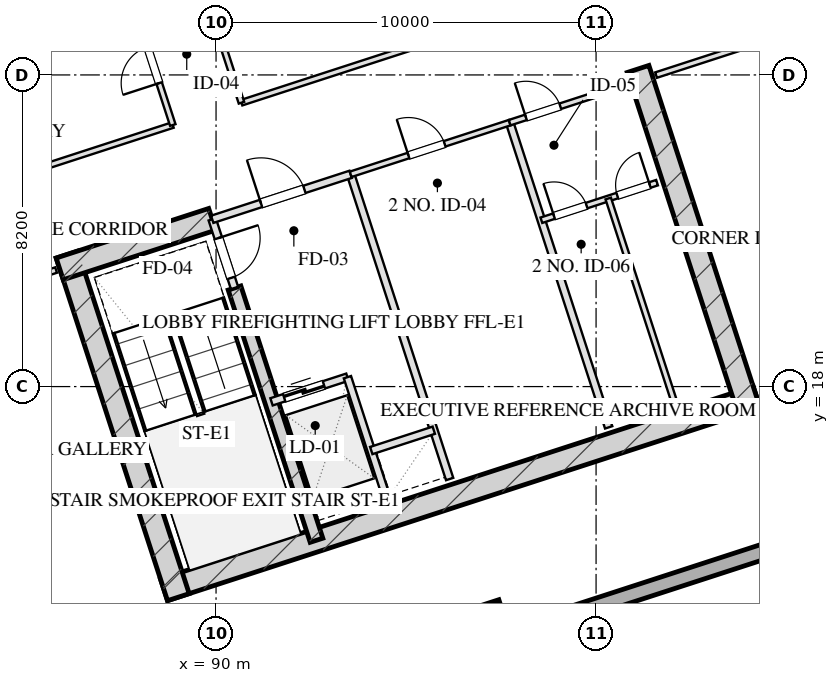
"""IFC4 building model, lengths in metres.
Left out: names, types, materials, properties, quantities, classifications, styles, units other than length and angle.
Written with IfcOpenShell. Run it as: python <this file> out.ifc"""

import sys

from ifc_helpers import new_model, si_unit, direction, frame, frame_2d, origin, origin_2d, place, context, subcontext, project, spatial, rectangle, hollow_rectangle, extrude, element, fill, save


model = new_model("IFC4")
c1 = context("Model", 3, precision=1e-05, world=origin(), true_north=direction((0.0, 1.0)))
c2 = subcontext(c1, "Body", "Model", "MODEL_VIEW")
j1 = project(units=[si_unit("LENGTHUNIT", "METRE"), si_unit("PLANEANGLEUNIT", "RADIAN")], contexts=[c1])
p1 = place(None, origin())
s1 = spatial("IfcSite", under=j1, at=p1, CompositionType="ELEMENT")
p2 = place(p1, origin())
s2 = spatial("IfcBuilding", under=s1, at=p2, CompositionType="ELEMENT")
p3 = place(p2, frame((0.0, 0.0, 180.55)))
s3 = spatial("IfcBuildingStorey", under=s2, at=p3, CompositionType="ELEMENT", Elevation=180.55)
p4 = place(p3, frame((88.63, 12.652, 0.0), z_axis=(0.0, 0.0, 1.0), x_axis=(0.95105714907, 0.309015046886, 0.0)))
e1 = element("IfcWall", 1, at=p4, inside=s3, PredefinedType="SHEAR", context=c2, shape_type="SweptSolid", body=[
    extrude(rectangle(XDim=16.4, YDim=0.6, at=frame_2d((8.2, 0.0))), origin(), (0.0, 0.0, 1.0), 3.45),
])
p5 = place(p3, frame((86.078, 21.475, 0.0), z_axis=(0.0, 0.0, 1.0), x_axis=(0.309017938678, -0.951056209472, 0.0)))
e2 = element("IfcWall", 2, at=p5, inside=s3, PredefinedType="SHEAR", context=c2, shape_type="SweptSolid", body=[
    extrude(rectangle(XDim=9.48, YDim=0.6, at=frame_2d((4.74, 0.0))), origin(), (0.0, 0.0, 1.0), 3.45),
])
p6 = place(p3, frame((101.105, 26.358, 0.0), z_axis=(0.0, 0.0, 1.0), x_axis=(0.309010370028, -0.95105866865, 0.0)))
e3 = element("IfcWall", 3, at=p6, inside=s3, PredefinedType="SHEAR", context=c2, shape_type="SweptSolid", body=[
    extrude(rectangle(XDim=9.48, YDim=0.6, at=frame_2d((4.74, 0.0))), origin(), (0.0, 0.0, 1.0), 3.45),
])
p7 = place(p3, frame((90.486, 20.594, 0.0), z_axis=(0.0, 0.0, 1.0), x_axis=(0.309020428229, -0.951055400562, 0.0)))
e4 = element("IfcWall", 4, at=p7, inside=s3, PredefinedType="SHEAR", context=c2, shape_type="SweptSolid", body=[
    extrude(rectangle(XDim=6.98, YDim=0.35, at=frame_2d((3.49, 0.0))), origin(), (0.0, 0.0, 1.0), 3.45),
])
p8 = place(p3, frame((85.886, 21.097, 0.0), z_axis=(0.0, 0.0, 1.0), x_axis=(0.951068073652, 0.308981422225, 0.0)))
e5 = element("IfcWall", 5, at=p8, inside=s3, PredefinedType="SHEAR", context=c2, shape_type="SweptSolid", body=[
    extrude(rectangle(XDim=4.22, YDim=0.6, at=frame_2d((2.11, 0.0))), origin(), (0.0, 0.0, 1.0), 3.45),
])
p9 = place(p3, frame((97.185, 11.888, 0.0), z_axis=(0.0, 0.0, 1.0), x_axis=(0.951056516295, 0.309016994375, 0.0)))
e6 = element("IfcColumn", 6, at=p9, inside=s3, PredefinedType="COLUMN", context=c2, shape_type="SweptSolid", body=[
    extrude(hollow_rectangle(XDim=0.8, YDim=0.8, WallThickness=0.028, at=origin_2d()), origin(), (0.0, 0.0, 1.0), 3.451),
])
p10 = place(p3, frame((98.224, 59.173, 0.0), z_axis=(0.0, 0.0, 1.0), x_axis=(0.309014228706, -0.951057414911, 0.0)))
e7 = element("IfcWall", 7, at=p10, inside=s3, PredefinedType="SOLIDWALL", context=c2, shape_type="SweptSolid", body=[
    extrude(rectangle(XDim=42.8, YDim=0.4, at=frame_2d((21.4, 0.0))), origin(), (0.0, 0.0, 1.0), 2.55),
])
p11 = place(p10, frame((26.75, 0.0, 0.75)))
e8 = element("IfcOpeningElement", 8, at=p11, cuts=e7, PredefinedType="OPENING", context=c2, shape_type="SweptSolid", body=[
    extrude(rectangle(XDim=2.1, YDim=1.4, at=frame_2d((1.05, 0.7))), frame((0.0, 0.21, 0.0), z_axis=(0.0, -1.0, 0.0), x_axis=(1.0, 0.0, 0.0)), (0.0, 0.0, 1.0), 0.42),
])
p12 = place(p10, frame((22.95, 0.0, 0.75)))
e9 = element("IfcOpeningElement", 9, at=p12, cuts=e7, PredefinedType="OPENING", context=c2, shape_type="SweptSolid", body=[
    extrude(rectangle(XDim=2.1, YDim=1.4, at=frame_2d((1.05, 0.7))), frame((0.0, 0.21, 0.0), z_axis=(0.0, -1.0, 0.0), x_axis=(1.0, 0.0, 0.0)), (0.0, 0.0, 1.0), 0.42),
])
p13 = place(p10, frame((17.75, 0.0, 0.75)))
e10 = element("IfcOpeningElement", 10, at=p13, cuts=e7, PredefinedType="OPENING", context=c2, shape_type="SweptSolid", body=[
    extrude(rectangle(XDim=2.1, YDim=1.4, at=frame_2d((1.05, 0.7))), frame((0.0, 0.21, 0.0), z_axis=(0.0, -1.0, 0.0), x_axis=(1.0, 0.0, 0.0)), (0.0, 0.0, 1.0), 0.42),
])
p14 = place(p10, frame((13.95, 0.0, 0.75)))
e11 = element("IfcOpeningElement", 11, at=p14, cuts=e7, PredefinedType="OPENING", context=c2, shape_type="SweptSolid", body=[
    extrude(rectangle(XDim=2.1, YDim=1.4, at=frame_2d((1.05, 0.7))), frame((0.0, 0.21, 0.0), z_axis=(0.0, -1.0, 0.0), x_axis=(1.0, 0.0, 0.0)), (0.0, 0.0, 1.0), 0.42),
])
p15 = place(p3, frame((109.908, 15.444, 0.0), z_axis=(0.0, 0.0, 1.0), x_axis=(-0.951057580055, -0.30901372044, 0.0)))
e12 = element("IfcWall", 12, at=p15, inside=s3, PredefinedType="SOLIDWALL", context=c2, shape_type="SweptSolid", body=[
    extrude(rectangle(XDim=26.4, YDim=0.4, at=frame_2d((13.2, 0.0))), origin(), (0.0, 0.0, 1.0), 2.55),
])
p16 = place(p3, frame((89.899, 22.401, 0.0), z_axis=(0.0, 0.0, 1.0), x_axis=(0.308932062672, -0.951084108086, 0.0)))
e13 = element("IfcWall", 13, at=p16, inside=s3, PredefinedType="PARTITIONING", context=c2, shape_type="SweptSolid", body=[
    extrude(rectangle(XDim=1.9, YDim=0.2, at=frame_2d((0.95, 0.0))), origin(), (0.0, 0.0, 1.0), 3.155),
])
p17 = place(p16, frame((0.52, 0.0, 0.0)))
e14 = element("IfcOpeningElement", 14, at=p17, cuts=e13, PredefinedType="OPENING", context=c2, shape_type="SweptSolid", body=[
    extrude(rectangle(XDim=1.1, YDim=2.05, at=frame_2d((0.55, 1.025))), frame((0.0, 0.11, 0.0), z_axis=(0.0, -1.0, 0.0), x_axis=(1.0, 0.0, 0.0)), (0.0, 0.0, 1.0), 0.22),
])
p18 = place(p3, frame((93.542, 23.585, 0.0), z_axis=(0.0, 0.0, 1.0), x_axis=(0.309042196757, -0.951048327176, 0.0)))
e15 = element("IfcWall", 15, at=p18, inside=s3, PredefinedType="PARTITIONING", context=c2, shape_type="SweptSolid", body=[
    extrude(rectangle(XDim=8.43, YDim=0.2, at=frame_2d((4.215, 0.0))), origin(), (0.0, 0.0, 1.0), 3.155),
])
p19 = place(p3, frame((89.899, 22.401, 0.0), z_axis=(0.0, 0.0, 1.0), x_axis=(0.951046716504, 0.309047153403, 0.0)))
e16 = element("IfcWall", 16, at=p19, inside=s3, PredefinedType="PARTITIONING", context=c2, shape_type="SweptSolid", body=[
    extrude(rectangle(XDim=3.83, YDim=0.2, at=frame_2d((1.915, 0.0))), origin(), (0.0, 0.0, 1.0), 3.155),
])
p20 = place(p19, frame((1.35, 0.0, 0.0)))
e17 = element("IfcOpeningElement", 17, at=p20, cuts=e16, PredefinedType="OPENING", context=c2, shape_type="SweptSolid", body=[
    extrude(rectangle(XDim=1.2, YDim=2.05, at=frame_2d((0.6, 1.025))), frame((0.0, 0.11, 0.0), z_axis=(0.0, -1.0, 0.0), x_axis=(1.0, 0.0, 0.0)), (0.0, 0.0, 1.0), 0.22),
])
p21 = place(p3, frame((91.46, 17.598, 0.0), z_axis=(0.0, 0.0, 1.0), x_axis=(0.951062257173, 0.308999325213, 0.0)))
e18 = element("IfcWall", 18, at=p21, inside=s3, PredefinedType="PARTITIONING", context=c2, shape_type="SweptSolid", body=[
    extrude(rectangle(XDim=2.1, YDim=0.2, at=frame_2d((1.05, 0.0))), origin(), (0.0, 0.0, 1.0), 3.155),
])
p22 = place(p21, frame((0.35, 0.0, 0.0)))
e19 = element("IfcOpeningElement", 19, at=p22, cuts=e18, PredefinedType="OPENING", context=c2, shape_type="SweptSolid", body=[
    extrude(rectangle(XDim=1.1, YDim=2.05, at=frame_2d((0.55, 1.025))), frame((0.0, 0.11, 0.0), z_axis=(0.0, -1.0, 0.0), x_axis=(1.0, 0.0, 0.0)), (0.0, 0.0, 1.0), 0.22),
])
p23 = place(p3, frame((93.457, 18.247, 0.0), z_axis=(0.0, 0.0, 1.0), x_axis=(0.3089935693, -0.951064127245, 0.0)))
e20 = element("IfcWall", 20, at=p23, inside=s3, PredefinedType="PARTITIONING", context=c2, shape_type="SweptSolid", body=[
    extrude(rectangle(XDim=3.7, YDim=0.2, at=frame_2d((1.85, 0.0))), origin(), (0.0, 0.0, 1.0), 3.155),
])
p24 = place(p3, frame((94.084, 16.317, 0.0), z_axis=(0.0, 0.0, 1.0), x_axis=(0.951041328149, 0.309063734775, 0.0)))
e21 = element("IfcWall", 21, at=p24, inside=s3, PredefinedType="PARTITIONING", context=c2, shape_type="SweptSolid", body=[
    extrude(rectangle(XDim=1.73, YDim=0.2, at=frame_2d((0.865, 0.0))), origin(), (0.0, 0.0, 1.0), 3.155),
])
p25 = place(p3, frame((97.727, 24.944, 0.0), z_axis=(0.0, 0.0, 1.0), x_axis=(0.309016001439, -0.951056838919, 0.0)))
e22 = element("IfcWall", 22, at=p25, inside=s3, PredefinedType="PARTITIONING", context=c2, shape_type="SweptSolid", body=[
    extrude(rectangle(XDim=8.43, YDim=0.2, at=frame_2d((4.215, 0.0))), origin(), (0.0, 0.0, 1.0), 3.155),
])
p26 = place(p3, frame((93.542, 23.585, 0.0), z_axis=(0.0, 0.0, 1.0), x_axis=(0.951063829732, 0.308994485023, 0.0)))
e23 = element("IfcWall", 23, at=p26, inside=s3, PredefinedType="PARTITIONING", context=c2, shape_type="SweptSolid", body=[
    extrude(rectangle(XDim=4.4, YDim=0.15, at=frame_2d((2.2, 0.0))), origin(), (0.0, 0.0, 1.0), 3.155),
])
p27 = place(p26, frame((1.6, 0.0, 0.0)))
e24 = element("IfcOpeningElement", 24, at=p27, cuts=e23, PredefinedType="OPENING", context=c2, shape_type="SweptSolid", body=[
    extrude(rectangle(XDim=1.0, YDim=2.05, at=frame_2d((0.5, 1.025))), frame((0.0, 0.085, 0.0), z_axis=(0.0, -1.0, 0.0), x_axis=(1.0, 0.0, 0.0)), (0.0, 0.0, 1.0), 0.17),
])
p28 = place(p3, frame((97.727, 24.944, 0.0), z_axis=(0.0, 0.0, 1.0), x_axis=(0.951036872128, 0.309077446369, 0.0)))
e25 = element("IfcWall", 25, at=p28, inside=s3, PredefinedType="PARTITIONING", context=c2, shape_type="SweptSolid", body=[
    extrude(rectangle(XDim=3.2, YDim=0.15, at=frame_2d((1.6, 0.0))), origin(), (0.0, 0.0, 1.0), 3.155),
])
p29 = place(p28, frame((0.45, 0.0, 0.0)))
e26 = element("IfcOpeningElement", 26, at=p29, cuts=e25, PredefinedType="OPENING", context=c2, shape_type="SweptSolid", body=[
    extrude(rectangle(XDim=0.95, YDim=2.05, at=frame_2d((0.475, 1.025))), frame((0.0, 0.085, 0.0), z_axis=(0.0, -1.0, 0.0), x_axis=(1.0, 0.0, 0.0)), (0.0, 0.0, 1.0), 0.17),
])
p30 = place(p3, frame((98.561, 22.376, 0.0), z_axis=(0.0, 0.0, 1.0), x_axis=(0.95104415986, 0.309055020985, 0.0)))
e27 = element("IfcWall", 27, at=p30, inside=s3, PredefinedType="PARTITIONING", context=c2, shape_type="SweptSolid", body=[
    extrude(rectangle(XDim=3.2, YDim=0.15, at=frame_2d((1.6, 0.0))), origin(), (0.0, 0.0, 1.0), 3.155),
])
p31 = place(p30, frame((0.35, 0.0, 0.0)))
e28 = element("IfcOpeningElement", 28, at=p31, cuts=e27, PredefinedType="OPENING", context=c2, shape_type="SweptSolid", body=[
    extrude(rectangle(XDim=0.9, YDim=2.05, at=frame_2d((0.45, 1.025))), frame((0.0, 0.085, 0.0), z_axis=(0.0, -1.0, 0.0), x_axis=(1.0, 0.0, 0.0)), (0.0, 0.0, 1.0), 0.17),
])
p32 = place(p30, frame((2.1, 0.0, 0.0)))
e29 = element("IfcOpeningElement", 29, at=p32, cuts=e27, PredefinedType="OPENING", context=c2, shape_type="SweptSolid", body=[
    extrude(rectangle(XDim=0.9, YDim=2.05, at=frame_2d((0.45, 1.025))), frame((0.0, 0.085, 0.0), z_axis=(0.0, -1.0, 0.0), x_axis=(1.0, 0.0, 0.0)), (0.0, 0.0, 1.0), 0.17),
])
p33 = place(p3, frame((100.32, 22.948, 0.0), z_axis=(0.0, 0.0, 1.0), x_axis=(0.309035009867, -0.951050662518, 0.0)))
e30 = element("IfcWall", 30, at=p33, inside=s3, PredefinedType="PARTITIONING", context=c2, shape_type="SweptSolid", body=[
    extrude(rectangle(XDim=5.73, YDim=0.15, at=frame_2d((2.865, 0.0))), origin(), (0.0, 0.0, 1.0), 3.155),
])
p34 = place(p3, frame((78.753, 18.78, 0.0), z_axis=(0.0, 0.0, 1.0), x_axis=(0.951060977215, 0.309003264738, 0.0)))
e31 = element("IfcWall", 31, at=p34, inside=s3, PredefinedType="PARTITIONING", context=c2, shape_type="SweptSolid", body=[
    extrude(rectangle(XDim=7.4, YDim=0.15, at=frame_2d((3.7, 0.0))), origin(), (0.0, 0.0, 1.0), 3.155),
])
p35 = place(p34, frame((3.108, 0.0, 0.0)))
e32 = element("IfcOpeningElement", 32, at=p35, cuts=e31, PredefinedType="OPENING", context=c2, shape_type="SweptSolid", body=[
    extrude(rectangle(XDim=1.0, YDim=2.05, at=frame_2d((0.5, 1.025))), frame((0.0, 0.085, 0.0), z_axis=(0.0, -1.0, 0.0), x_axis=(1.0, 0.0, 0.0)), (0.0, 0.0, 1.0), 0.17),
])
p36 = place(p3, frame((101.578, 26.196, 0.0), z_axis=(0.0, 0.0, 1.0), x_axis=(0.951064934653, 0.308991084134, 0.0)))
e33 = element("IfcWall", 33, at=p36, inside=s3, PredefinedType="PARTITIONING", context=c2, shape_type="SweptSolid", body=[
    extrude(rectangle(XDim=6.8, YDim=0.15, at=frame_2d((3.4, 0.0))), origin(), (0.0, 0.0, 1.0), 3.155),
])
p37 = place(p36, frame((2.856, 0.0, 0.0)))
e34 = element("IfcOpeningElement", 34, at=p37, cuts=e33, PredefinedType="OPENING", context=c2, shape_type="SweptSolid", body=[
    extrude(rectangle(XDim=1.0, YDim=2.05, at=frame_2d((0.5, 1.025))), frame((0.0, 0.085, 0.0), z_axis=(0.0, -1.0, 0.0), x_axis=(1.0, 0.0, 0.0)), (0.0, 0.0, 1.0), 0.17),
])
p38 = place(p3, frame((77.925, 21.328, 0.0), z_axis=(0.0, 0.0, 1.0), x_axis=(0.951054972381, 0.309021746015, 0.0)))
e35 = element("IfcWall", 35, at=p38, inside=s3, PredefinedType="PARTITIONING", context=c2, shape_type="SweptSolid", body=[
    extrude(rectangle(XDim=11.5, YDim=0.15, at=frame_2d((5.75, 0.0))), origin(), (0.0, 0.0, 1.0), 3.155),
])
p39 = place(p3, frame((90.669, 25.469, 0.0), z_axis=(0.0, 0.0, 1.0), x_axis=(0.95106136293, 0.309002077568, 0.0)))
e36 = element("IfcWall", 36, at=p39, inside=s3, PredefinedType="PARTITIONING", context=c2, shape_type="SweptSolid", body=[
    extrude(rectangle(XDim=8.15, YDim=0.15, at=frame_2d((4.075, 0.0))), origin(), (0.0, 0.0, 1.0), 3.155),
])
p40 = place(p3, frame((88.862, 24.882, 0.0), z_axis=(0.0, 0.0, 1.0), x_axis=(-0.309008771245, 0.951059188113, 0.0)))
e37 = element("IfcWall", 37, at=p40, inside=s3, PredefinedType="PARTITIONING", context=c2, shape_type="SweptSolid", body=[
    extrude(rectangle(XDim=16.64, YDim=0.15, at=frame_2d((8.32, 0.0))), origin(), (0.0, 0.0, 1.0), 3.155),
])
p41 = place(p40, frame((1.16, 0.0, 0.0)))
e38 = element("IfcOpeningElement", 38, at=p41, cuts=e37, PredefinedType="OPENING", context=c2, shape_type="SweptSolid", body=[
    extrude(rectangle(XDim=1.0, YDim=2.05, at=frame_2d((0.5, 1.025))), frame((0.0, 0.085, 0.0), z_axis=(0.0, -1.0, 0.0), x_axis=(1.0, 0.0, 0.0)), (0.0, 0.0, 1.0), 0.17),
])
p42 = place(p40, frame((5.48, 0.0, 0.0)))
e39 = element("IfcOpeningElement", 39, at=p42, cuts=e37, PredefinedType="OPENING", context=c2, shape_type="SweptSolid", body=[
    extrude(rectangle(XDim=1.05, YDim=2.05, at=frame_2d((0.525, 1.025))), frame((0.0, 0.085, 0.0), z_axis=(0.0, -1.0, 0.0), x_axis=(1.0, 0.0, 0.0)), (0.0, 0.0, 1.0), 0.17),
])
p43 = place(p40, frame((8.08, 0.0, 0.0)))
e40 = element("IfcOpeningElement", 40, at=p43, cuts=e37, PredefinedType="OPENING", context=c2, shape_type="SweptSolid", body=[
    extrude(rectangle(XDim=1.0, YDim=2.05, at=frame_2d((0.5, 1.025))), frame((0.0, 0.085, 0.0), z_axis=(0.0, -1.0, 0.0), x_axis=(1.0, 0.0, 0.0)), (0.0, 0.0, 1.0), 0.17),
])
p44 = place(p40, frame((10.92, 0.0, 0.0)))
e41 = element("IfcOpeningElement", 41, at=p44, cuts=e37, PredefinedType="OPENING", context=c2, shape_type="SweptSolid", body=[
    extrude(rectangle(XDim=1.0, YDim=2.05, at=frame_2d((0.5, 1.025))), frame((0.0, 0.085, 0.0), z_axis=(0.0, -1.0, 0.0), x_axis=(1.0, 0.0, 0.0)), (0.0, 0.0, 1.0), 0.17),
])
p45 = place(p40, frame((14.48, 0.0, 0.0)))
e42 = element("IfcOpeningElement", 42, at=p45, cuts=e37, PredefinedType="OPENING", context=c2, shape_type="SweptSolid", body=[
    extrude(rectangle(XDim=0.85, YDim=2.05, at=frame_2d((0.425, 1.025))), frame((0.0, 0.085, 0.0), z_axis=(0.0, -1.0, 0.0), x_axis=(1.0, 0.0, 0.0)), (0.0, 0.0, 1.0), 0.17),
])
p46 = place(p3, frame((90.669, 25.469, 0.0), z_axis=(0.0, 0.0, 1.0), x_axis=(-0.309022042254, 0.951054876125, 0.0)))
e43 = element("IfcWall", 43, at=p46, inside=s3, PredefinedType="PARTITIONING", context=c2, shape_type="SweptSolid", body=[
    extrude(rectangle(XDim=16.64, YDim=0.15, at=frame_2d((8.32, 0.0))), origin(), (0.0, 0.0, 1.0), 3.155),
])
p47 = place(p46, frame((1.944, 0.0, 0.0)))
e44 = element("IfcOpeningElement", 44, at=p47, cuts=e43, PredefinedType="OPENING", context=c2, shape_type="SweptSolid", body=[
    extrude(rectangle(XDim=1.1, YDim=2.05, at=frame_2d((0.55, 1.025))), frame((0.0, 0.085, 0.0), z_axis=(0.0, -1.0, 0.0), x_axis=(1.0, 0.0, 0.0)), (0.0, 0.0, 1.0), 0.17),
])
p48 = place(p46, frame((14.264, 0.0, 0.0)))
e45 = element("IfcOpeningElement", 45, at=p48, cuts=e43, PredefinedType="OPENING", context=c2, shape_type="SweptSolid", body=[
    extrude(rectangle(XDim=1.1, YDim=2.05, at=frame_2d((0.55, 1.025))), frame((0.0, 0.085, 0.0), z_axis=(0.0, -1.0, 0.0), x_axis=(1.0, 0.0, 0.0)), (0.0, 0.0, 1.0), 0.17),
])
p49 = place(p3, frame((76.59, 25.437, 0.0), z_axis=(0.0, 0.0, 1.0), x_axis=(0.951054972381, 0.309021746015, 0.0)))
e46 = element("IfcWall", 46, at=p49, inside=s3, PredefinedType="PARTITIONING", context=c2, shape_type="SweptSolid", body=[
    extrude(rectangle(XDim=11.5, YDim=0.15, at=frame_2d((5.75, 0.0))), origin(), (0.0, 0.0, 1.0), 3.155),
])
p50 = place(p17, origin())
e47 = element("IfcDoor", 47, at=p50, inside=s3, OperationType="SINGLE_SWING_LEFT", PredefinedType="DOOR", context=c2, shape_type="SweptSolid", body=[
    extrude(rectangle(XDim=1.1, YDim=2.05, at=frame_2d((0.55, 1.025))), frame((0.0, 0.025, 0.0), z_axis=(0.0, -1.0, 0.0), x_axis=(1.0, 0.0, 0.0)), (0.0, 0.0, 1.0), 0.05),
])
fill(e14, e47)
p51 = place(p20, origin())
e48 = element("IfcDoor", 48, at=p51, inside=s3, OperationType="SINGLE_SWING_LEFT", PredefinedType="DOOR", context=c2, shape_type="SweptSolid", body=[
    extrude(rectangle(XDim=1.2, YDim=2.05, at=frame_2d((0.6, 1.025))), frame((0.0, 0.025, 0.0), z_axis=(0.0, -1.0, 0.0), x_axis=(1.0, 0.0, 0.0)), (0.0, 0.0, 1.0), 0.05),
])
fill(e17, e48)
p52 = place(p22, origin())
e49 = element("IfcDoor", 49, at=p52, inside=s3, OperationType="DOUBLE_DOOR_SLIDING", PredefinedType="DOOR", context=c2, shape_type="SweptSolid", body=[
    extrude(rectangle(XDim=1.1, YDim=2.05, at=frame_2d((0.55, 1.025))), frame((0.0, 0.025, 0.0), z_axis=(0.0, -1.0, 0.0), x_axis=(1.0, 0.0, 0.0)), (0.0, 0.0, 1.0), 0.05),
])
fill(e19, e49)
p53 = place(p27, origin())
e50 = element("IfcDoor", 50, at=p53, inside=s3, OperationType="SINGLE_SWING_LEFT", PredefinedType="DOOR", context=c2, shape_type="SweptSolid", body=[
    extrude(rectangle(XDim=1.0, YDim=2.05, at=frame_2d((0.5, 1.025))), frame((0.0, 0.025, 0.0), z_axis=(0.0, -1.0, 0.0), x_axis=(1.0, 0.0, 0.0)), (0.0, 0.0, 1.0), 0.05),
])
fill(e24, e50)
p54 = place(p29, origin())
e51 = element("IfcDoor", 51, at=p54, inside=s3, OperationType="SINGLE_SWING_LEFT", PredefinedType="DOOR", context=c2, shape_type="SweptSolid", body=[
    extrude(rectangle(XDim=0.95, YDim=2.05, at=frame_2d((0.475, 1.025))), frame((0.0, 0.025, 0.0), z_axis=(0.0, -1.0, 0.0), x_axis=(1.0, 0.0, 0.0)), (0.0, 0.0, 1.0), 0.05),
])
fill(e26, e51)
p55 = place(p31, origin())
e52 = element("IfcDoor", 52, at=p55, inside=s3, OperationType="SINGLE_SWING_LEFT", PredefinedType="DOOR", context=c2, shape_type="SweptSolid", body=[
    extrude(rectangle(XDim=0.9, YDim=2.05, at=frame_2d((0.45, 1.025))), frame((0.0, 0.025, 0.0), z_axis=(0.0, -1.0, 0.0), x_axis=(1.0, 0.0, 0.0)), (0.0, 0.0, 1.0), 0.05),
])
fill(e28, e52)
p56 = place(p32, origin())
e53 = element("IfcDoor", 53, at=p56, inside=s3, OperationType="SINGLE_SWING_RIGHT", PredefinedType="DOOR", context=c2, shape_type="SweptSolid", body=[
    extrude(rectangle(XDim=0.9, YDim=2.05, at=frame_2d((0.45, 1.025))), frame((0.0, 0.025, 0.0), z_axis=(0.0, -1.0, 0.0), x_axis=(1.0, 0.0, 0.0)), (0.0, 0.0, 1.0), 0.05),
])
fill(e29, e53)
p57 = place(p41, origin())
e54 = element("IfcDoor", 54, at=p57, inside=s3, OperationType="SINGLE_SWING_LEFT", PredefinedType="DOOR", context=c2, shape_type="SweptSolid", body=[
    extrude(rectangle(XDim=1.0, YDim=2.05, at=frame_2d((0.5, 1.025))), frame((0.0, 0.025, 0.0), z_axis=(0.0, -1.0, 0.0), x_axis=(1.0, 0.0, 0.0)), (0.0, 0.0, 1.0), 0.05),
])
fill(e38, e54)
save(model, sys.argv[1])
